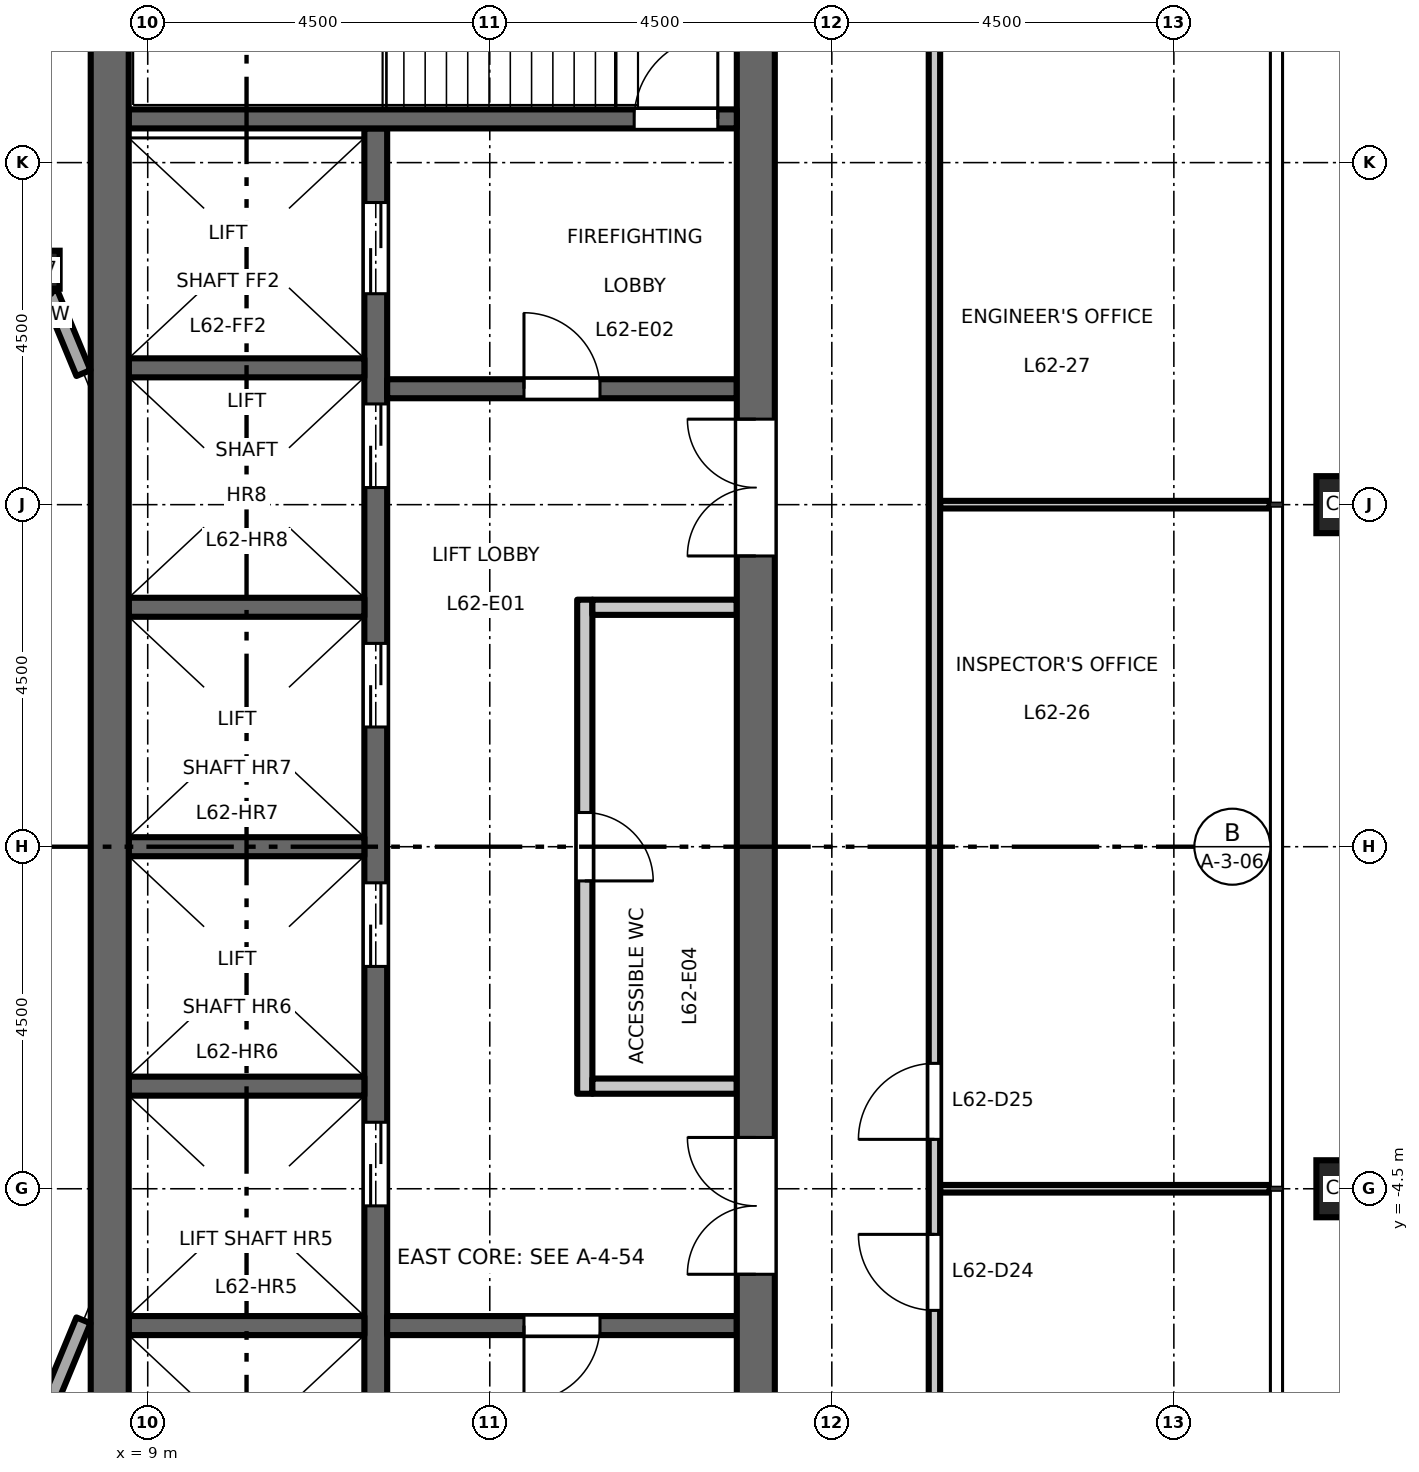
"""IFC4 building model, lengths in metres.
Left out: names, types, materials, properties, quantities, classifications, styles, units other than length and angle.
Written with IfcOpenShell. Run it as: python <this file> out.ifc"""

import sys

from ifc_helpers import new_model, si_unit, direction, frame, frame_2d, origin, origin_2d, place, context, subcontext, project, spatial, rectangle, hollow_rectangle, extrude, element, fill, save


model = new_model("IFC4")
c1 = context("Model", 3, precision=1e-05, world=origin(), true_north=direction((0.0, 1.0)))
c2 = subcontext(c1, "Body", "Model", "MODEL_VIEW")
j1 = project(units=[si_unit("LENGTHUNIT", "METRE"), si_unit("PLANEANGLEUNIT", "RADIAN")], contexts=[c1])
p1 = place(None, origin())
s1 = spatial("IfcSite", under=j1, at=p1, CompositionType="ELEMENT")
p2 = place(p1, origin())
s2 = spatial("IfcBuilding", under=s1, at=p2, CompositionType="ELEMENT")
p3 = place(p2, frame((0.0, 0.0, 289.7)))
s3 = spatial("IfcBuildingStorey", under=s2, at=p3, CompositionType="ELEMENT", Elevation=289.7)
for number, where, z_axis, x_axis in (
    (1, (24.75, -4.5, 0.0), (0.0, 0.0, 1.0), (1.0, 0.0, 0.0)),
    (2, (24.75, 4.5, 0.0), (0.0, 0.0, 1.0), (1.0, 0.0, 0.0)),
):
    element("IfcColumn", number, at=place(p3, frame(where, z_axis=z_axis, x_axis=x_axis)), inside=s3, PredefinedType="COLUMN", context=c2, shape_type="SweptSolid", body=[
        extrude(hollow_rectangle(XDim=0.75, YDim=0.75, WallThickness=0.04, at=origin_2d()), origin(), (0.0, 0.0, 1.0), 4.5),
    ])
p4 = place(p3, frame((7.591, 7.591, 0.0), z_axis=(0.0, 0.0, 1.0), x_axis=(1.0, 0.0, 0.0)))
e3 = element("IfcColumn", 3, at=p4, inside=s3, PredefinedType="COLUMN", context=c2, shape_type="SweptSolid", body=[
    extrude(hollow_rectangle(XDim=0.5, YDim=0.5, WallThickness=0.025, at=origin_2d()), origin(), (0.0, 0.0, 1.0), 4.5),
])
p5 = place(p3, frame((14.75, -3.25, 0.0), z_axis=(0.0, 0.0, 1.0), x_axis=(0.0, 1.0, 0.0)))
e4 = element("IfcWall", 4, at=p5, inside=s3, PredefinedType="PARTITIONING", context=c2, shape_type="SweptSolid", body=[
    extrude(rectangle(XDim=6.5, YDim=0.2, at=frame_2d((3.25, 0.0))), origin(), (0.0, 0.0, 1.0), 4.35),
])
p6 = place(p5, frame((2.8, 0.0, 0.0)))
e5 = element("IfcOpeningElement", 5, at=p6, cuts=e4, PredefinedType="OPENING", context=c2, shape_type="SweptSolid", body=[
    extrude(rectangle(XDim=0.9, YDim=2.1, at=frame_2d((0.45, 1.05))), frame((0.0, 0.11, 0.0), z_axis=(0.0, -1.0, 0.0), x_axis=(1.0, 0.0, 0.0)), (0.0, 0.0, 1.0), 0.22),
])
for number, where, z_axis, x_axis in (
    (6, (14.85, 3.15, 0.0), (0.0, 0.0, 1.0), (1.0, 0.0, 0.0)),
    (7, (14.85, -3.15, 0.0), (0.0, 0.0, 1.0), (1.0, 0.0, 0.0)),
):
    element("IfcWall", number, at=place(p3, frame(where, z_axis=z_axis, x_axis=x_axis)), inside=s3, PredefinedType="PARTITIONING", context=c2, shape_type="SweptSolid", body=[
        extrude(rectangle(XDim=1.9, YDim=0.2, at=frame_2d((0.95, 0.0))), origin(), (0.0, 0.0, 1.0), 4.35),
    ])
p7 = place(p3, frame((12.0, -9.45, 0.0), z_axis=(0.0, 0.0, 1.0), x_axis=(0.0, 1.0, 0.0)))
e8 = element("IfcWall", 8, at=p7, inside=s3, PredefinedType="SHEAR", context=c2, shape_type="SweptSolid", body=[
    extrude(rectangle(XDim=18.9, YDim=0.3, at=frame_2d((9.45, 0.0))), origin(), (0.0, 0.0, 1.0), 4.35),
])
p8 = place(p7, frame((4.725, 0.0, 0.0)))
e9 = element("IfcOpeningElement", 9, at=p8, cuts=e8, PredefinedType="OPENING", context=c2, shape_type="SweptSolid", body=[
    extrude(rectangle(XDim=1.1, YDim=2.1, at=frame_2d((0.55, 1.05))), frame((0.0, 0.16, 0.0), z_axis=(0.0, -1.0, 0.0), x_axis=(1.0, 0.0, 0.0)), (0.0, 0.0, 1.0), 0.32),
])
p9 = place(p7, frame((7.875, 0.0, 0.0)))
e10 = element("IfcOpeningElement", 10, at=p9, cuts=e8, PredefinedType="OPENING", context=c2, shape_type="SweptSolid", body=[
    extrude(rectangle(XDim=1.1, YDim=2.1, at=frame_2d((0.55, 1.05))), frame((0.0, 0.16, 0.0), z_axis=(0.0, -1.0, 0.0), x_axis=(1.0, 0.0, 0.0)), (0.0, 0.0, 1.0), 0.32),
])
p10 = place(p7, frame((11.025, 0.0, 0.0)))
e11 = element("IfcOpeningElement", 11, at=p10, cuts=e8, PredefinedType="OPENING", context=c2, shape_type="SweptSolid", body=[
    extrude(rectangle(XDim=1.1, YDim=2.1, at=frame_2d((0.55, 1.05))), frame((0.0, 0.16, 0.0), z_axis=(0.0, -1.0, 0.0), x_axis=(1.0, 0.0, 0.0)), (0.0, 0.0, 1.0), 0.32),
])
p11 = place(p7, frame((14.175, 0.0, 0.0)))
e12 = element("IfcOpeningElement", 12, at=p11, cuts=e8, PredefinedType="OPENING", context=c2, shape_type="SweptSolid", body=[
    extrude(rectangle(XDim=1.1, YDim=2.1, at=frame_2d((0.55, 1.05))), frame((0.0, 0.16, 0.0), z_axis=(0.0, -1.0, 0.0), x_axis=(1.0, 0.0, 0.0)), (0.0, 0.0, 1.0), 0.32),
])
p12 = place(p7, frame((16.725, 0.0, 0.0)))
e13 = element("IfcOpeningElement", 13, at=p12, cuts=e8, PredefinedType="OPENING", context=c2, shape_type="SweptSolid", body=[
    extrude(rectangle(XDim=1.2, YDim=2.1, at=frame_2d((0.6, 1.05))), frame((0.0, 0.16, 0.0), z_axis=(0.0, -1.0, 0.0), x_axis=(1.0, 0.0, 0.0)), (0.0, 0.0, 1.0), 0.32),
])
p13 = place(p7, frame((0.975, 0.0, 0.0)))
e14 = element("IfcOpeningElement", 14, at=p13, cuts=e8, PredefinedType="OPENING", context=c2, shape_type="SweptSolid", body=[
    extrude(rectangle(XDim=1.2, YDim=2.1, at=frame_2d((0.6, 1.05))), frame((0.0, 0.16, 0.0), z_axis=(0.0, -1.0, 0.0), x_axis=(1.0, 0.0, 0.0)), (0.0, 0.0, 1.0), 0.32),
])
p14 = place(p3, frame((12.15, 6.025, 0.0), z_axis=(0.0, 0.0, 1.0), x_axis=(1.0, 0.0, 0.0)))
e15 = element("IfcWall", 15, at=p14, inside=s3, PredefinedType="SHEAR", context=c2, shape_type="SweptSolid", body=[
    extrude(rectangle(XDim=4.6, YDim=0.25, at=frame_2d((2.3, 0.0))), origin(), (0.0, 0.0, 1.0), 4.35),
])
p15 = place(p14, frame((1.8, 0.0, 0.0)))
e16 = element("IfcOpeningElement", 16, at=p15, cuts=e15, PredefinedType="OPENING", context=c2, shape_type="SweptSolid", body=[
    extrude(rectangle(XDim=1.0, YDim=2.1, at=frame_2d((0.5, 1.05))), frame((0.0, 0.135, 0.0), z_axis=(0.0, -1.0, 0.0), x_axis=(1.0, 0.0, 0.0)), (0.0, 0.0, 1.0), 0.27),
])
p16 = place(p3, frame((12.15, -6.3, 0.0), z_axis=(0.0, 0.0, 1.0), x_axis=(1.0, 0.0, 0.0)))
e17 = element("IfcWall", 17, at=p16, inside=s3, PredefinedType="SHEAR", context=c2, shape_type="SweptSolid", body=[
    extrude(rectangle(XDim=4.6, YDim=0.25, at=frame_2d((2.3, 0.0))), origin(), (0.0, 0.0, 1.0), 4.35),
])
p17 = place(p16, frame((1.8, 0.0, 0.0)))
e18 = element("IfcOpeningElement", 18, at=p17, cuts=e17, PredefinedType="OPENING", context=c2, shape_type="SweptSolid", body=[
    extrude(rectangle(XDim=1.0, YDim=2.1, at=frame_2d((0.5, 1.05))), frame((0.0, 0.135, 0.0), z_axis=(0.0, -1.0, 0.0), x_axis=(1.0, 0.0, 0.0)), (0.0, 0.0, 1.0), 0.27),
])
p18 = place(p3, frame((17.0, -13.0, 0.0), z_axis=(0.0, 0.0, 1.0), x_axis=(0.0, 1.0, 0.0)))
e19 = element("IfcWall", 19, at=p18, inside=s3, PredefinedType="SHEAR", context=c2, shape_type="SweptSolid", body=[
    extrude(rectangle(XDim=26.0, YDim=0.5, at=frame_2d((13.0, 0.0))), origin(), (0.0, 0.0, 1.0), 4.35),
])
p19 = place(p18, frame((16.825, 0.0, 0.0)))
e20 = element("IfcOpeningElement", 20, at=p19, cuts=e19, PredefinedType="OPENING", context=c2, shape_type="SweptSolid", body=[
    extrude(rectangle(XDim=1.8, YDim=2.1, at=frame_2d((0.9, 1.05))), frame((0.0, 0.26, 0.0), z_axis=(0.0, -1.0, 0.0), x_axis=(1.0, 0.0, 0.0)), (0.0, 0.0, 1.0), 0.52),
])
p20 = place(p18, frame((7.375, 0.0, 0.0)))
e21 = element("IfcOpeningElement", 21, at=p20, cuts=e19, PredefinedType="OPENING", context=c2, shape_type="SweptSolid", body=[
    extrude(rectangle(XDim=1.8, YDim=2.1, at=frame_2d((0.9, 1.05))), frame((0.0, 0.26, 0.0), z_axis=(0.0, -1.0, 0.0), x_axis=(1.0, 0.0, 0.0)), (0.0, 0.0, 1.0), 0.52),
])
for number, where, z_axis, x_axis in (
    (22, (8.75, 0.0, 0.0), (0.0, 0.0, 1.0), (1.0, 0.0, 0.0)),
    (23, (8.75, 3.15, 0.0), (0.0, 0.0, 1.0), (1.0, 0.0, 0.0)),
    (24, (8.75, 6.3, 0.0), (0.0, 0.0, 1.0), (1.0, 0.0, 0.0)),
    (25, (8.75, -3.15, 0.0), (0.0, 0.0, 1.0), (1.0, 0.0, 0.0)),
    (26, (8.75, -6.3, 0.0), (0.0, 0.0, 1.0), (1.0, 0.0, 0.0)),
):
    element("IfcWall", number, at=place(p3, frame(where, z_axis=z_axis, x_axis=x_axis)), inside=s3, PredefinedType="SHEAR", context=c2, shape_type="SweptSolid", body=[
        extrude(rectangle(XDim=3.1, YDim=0.25, at=frame_2d((1.55, 0.0))), origin(), (0.0, 0.0, 1.0), 4.35),
    ])
p21 = place(p3, frame((8.75, 9.575, 0.0), z_axis=(0.0, 0.0, 1.0), x_axis=(1.0, 0.0, 0.0)))
e27 = element("IfcWall", 27, at=p21, inside=s3, PredefinedType="SHEAR", context=c2, shape_type="SweptSolid", body=[
    extrude(rectangle(XDim=8.0, YDim=0.25, at=frame_2d((4.0, 0.0))), origin(), (0.0, 0.0, 1.0), 4.35),
])
p22 = place(p21, frame((6.65, 0.0, 0.0)))
e28 = element("IfcOpeningElement", 28, at=p22, cuts=e27, PredefinedType="OPENING", context=c2, shape_type="SweptSolid", body=[
    extrude(rectangle(XDim=1.1, YDim=2.1, at=frame_2d((0.55, 1.05))), frame((0.0, 0.135, 0.0), z_axis=(0.0, -1.0, 0.0), x_axis=(1.0, 0.0, 0.0)), (0.0, 0.0, 1.0), 0.27),
])
p23 = place(p3, frame((8.5, -13.0, 0.0), z_axis=(0.0, 0.0, 1.0), x_axis=(0.0, 1.0, 0.0)))
e29 = element("IfcWall", 29, at=p23, inside=s3, PredefinedType="SHEAR", context=c2, shape_type="SweptSolid", body=[
    extrude(rectangle(XDim=26.0, YDim=0.5, at=frame_2d((13.0, 0.0))), origin(), (0.0, 0.0, 1.0), 4.35),
])
for number, where, z_axis, x_axis in (
    (30, (7.716, -7.289, 0.0), (0.0, 0.0, 1.0), (0.383, 0.924, 0.0)),
    (31, (8.154, 6.231, 0.0), (0.0, 0.0, 1.0), (-0.383, 0.924, 0.0)),
):
    element("IfcWall", number, at=place(p3, frame(where, z_axis=z_axis, x_axis=x_axis)), inside=s3, PredefinedType="STANDARD", context=c2, shape_type="SweptSolid", body=[
        extrude(rectangle(XDim=1.146, YDim=0.2, at=frame_2d((0.573, 0.0))), origin(), (0.0, 0.0, 1.0), 4.01),
    ])
for number, where, z_axis, x_axis in (
    (32, (19.425, -4.5, 0.0), (0.0, 0.0, 1.0), (1.0, 0.0, 0.0)),
    (33, (19.425, 4.5, 0.0), (0.0, 0.0, 1.0), (1.0, 0.0, 0.0)),
):
    element("IfcWall", number, at=place(p3, frame(where, z_axis=z_axis, x_axis=x_axis)), inside=s3, PredefinedType="PARTITIONING", context=c2, shape_type="SweptSolid", body=[
        extrude(rectangle(XDim=4.335, YDim=0.1, at=frame_2d((2.167, 0.0))), origin(), (0.0, 0.0, 1.0), 4.35),
    ])
p24 = place(p3, frame((19.35, -16.425, 0.0), z_axis=(0.0, 0.0, 1.0), x_axis=(0.0, 1.0, 0.0)))
e34 = element("IfcWall", 34, at=p24, inside=s3, PredefinedType="PARTITIONING", context=c2, shape_type="SweptSolid", body=[
    extrude(rectangle(XDim=32.85, YDim=0.15, at=frame_2d((16.425, 0.0))), origin(), (0.0, 0.0, 1.0), 4.35),
])
p25 = place(p24, frame((10.325, 0.0, 0.0)))
e35 = element("IfcOpeningElement", 35, at=p25, cuts=e34, PredefinedType="OPENING", context=c2, shape_type="SweptSolid", body=[
    extrude(rectangle(XDim=1.0, YDim=2.1, at=frame_2d((0.5, 1.05))), frame((0.0, 0.085, 0.0), z_axis=(0.0, -1.0, 0.0), x_axis=(1.0, 0.0, 0.0)), (0.0, 0.0, 1.0), 0.17),
])
p26 = place(p24, frame((12.575, 0.0, 0.0)))
e36 = element("IfcOpeningElement", 36, at=p26, cuts=e34, PredefinedType="OPENING", context=c2, shape_type="SweptSolid", body=[
    extrude(rectangle(XDim=1.0, YDim=2.1, at=frame_2d((0.5, 1.05))), frame((0.0, 0.085, 0.0), z_axis=(0.0, -1.0, 0.0), x_axis=(1.0, 0.0, 0.0)), (0.0, 0.0, 1.0), 0.17),
])
p27 = place(p24, frame((28.325, 0.0, 0.0)))
e37 = element("IfcOpeningElement", 37, at=p27, cuts=e34, PredefinedType="OPENING", context=c2, shape_type="SweptSolid", body=[
    extrude(rectangle(XDim=1.0, YDim=2.1, at=frame_2d((0.5, 1.05))), frame((0.0, 0.085, 0.0), z_axis=(0.0, -1.0, 0.0), x_axis=(1.0, 0.0, 0.0)), (0.0, 0.0, 1.0), 0.17),
])
p28 = place(p15, origin())
e38 = element("IfcDoor", 38, at=p28, inside=s3, OperationType="SINGLE_SWING_RIGHT", PredefinedType="DOOR", context=c2, shape_type="SweptSolid", body=[
    extrude(rectangle(XDim=1.0, YDim=2.1, at=frame_2d((0.5, 1.05))), frame((0.0, 0.025, 0.0), z_axis=(0.0, -1.0, 0.0), x_axis=(1.0, 0.0, 0.0)), (0.0, 0.0, 1.0), 0.05),
])
fill(e16, e38)
p29 = place(p17, origin())
e39 = element("IfcDoor", 39, at=p29, inside=s3, OperationType="SINGLE_SWING_LEFT", PredefinedType="DOOR", context=c2, shape_type="SweptSolid", body=[
    extrude(rectangle(XDim=1.0, YDim=2.1, at=frame_2d((0.5, 1.05))), frame((0.0, 0.025, 0.0), z_axis=(0.0, -1.0, 0.0), x_axis=(1.0, 0.0, 0.0)), (0.0, 0.0, 1.0), 0.05),
])
fill(e18, e39)
p30 = place(p22, origin())
e40 = element("IfcDoor", 40, at=p30, inside=s3, OperationType="SINGLE_SWING_LEFT", PredefinedType="DOOR", context=c2, shape_type="SweptSolid", body=[
    extrude(rectangle(XDim=1.1, YDim=2.1, at=frame_2d((0.55, 1.05))), frame((0.0, 0.025, 0.0), z_axis=(0.0, -1.0, 0.0), x_axis=(1.0, 0.0, 0.0)), (0.0, 0.0, 1.0), 0.05),
])
fill(e28, e40)
p31 = place(p19, origin())
e41 = element("IfcDoor", 41, at=p31, inside=s3, OperationType="DOUBLE_DOOR_DOUBLE_SWING", PredefinedType="DOOR", context=c2, shape_type="SweptSolid", body=[
    extrude(rectangle(XDim=1.8, YDim=2.1, at=frame_2d((0.9, 1.05))), frame((0.0, 0.025, 0.0), z_axis=(0.0, -1.0, 0.0), x_axis=(1.0, 0.0, 0.0)), (0.0, 0.0, 1.0), 0.05),
])
fill(e20, e41)
p32 = place(p20, origin())
e42 = element("IfcDoor", 42, at=p32, inside=s3, OperationType="DOUBLE_DOOR_DOUBLE_SWING", PredefinedType="DOOR", context=c2, shape_type="SweptSolid", body=[
    extrude(rectangle(XDim=1.8, YDim=2.1, at=frame_2d((0.9, 1.05))), frame((0.0, 0.025, 0.0), z_axis=(0.0, -1.0, 0.0), x_axis=(1.0, 0.0, 0.0)), (0.0, 0.0, 1.0), 0.05),
])
fill(e21, e42)
p33 = place(p8, origin())
e43 = element("IfcDoor", 43, at=p33, inside=s3, OperationType="DOUBLE_DOOR_SLIDING", PredefinedType="DOOR", context=c2, shape_type="SweptSolid", body=[
    extrude(rectangle(XDim=1.1, YDim=2.1, at=frame_2d((0.55, 1.05))), frame((0.0, 0.025, 0.0), z_axis=(0.0, -1.0, 0.0), x_axis=(1.0, 0.0, 0.0)), (0.0, 0.0, 1.0), 0.05),
])
fill(e9, e43)
p34 = place(p9, origin())
e44 = element("IfcDoor", 44, at=p34, inside=s3, OperationType="DOUBLE_DOOR_SLIDING", PredefinedType="DOOR", context=c2, shape_type="SweptSolid", body=[
    extrude(rectangle(XDim=1.1, YDim=2.1, at=frame_2d((0.55, 1.05))), frame((0.0, 0.025, 0.0), z_axis=(0.0, -1.0, 0.0), x_axis=(1.0, 0.0, 0.0)), (0.0, 0.0, 1.0), 0.05),
])
fill(e10, e44)
p35 = place(p10, origin())
e45 = element("IfcDoor", 45, at=p35, inside=s3, OperationType="DOUBLE_DOOR_SLIDING", PredefinedType="DOOR", context=c2, shape_type="SweptSolid", body=[
    extrude(rectangle(XDim=1.1, YDim=2.1, at=frame_2d((0.55, 1.05))), frame((0.0, 0.025, 0.0), z_axis=(0.0, -1.0, 0.0), x_axis=(1.0, 0.0, 0.0)), (0.0, 0.0, 1.0), 0.05),
])
fill(e11, e45)
p36 = place(p11, origin())
e46 = element("IfcDoor", 46, at=p36, inside=s3, OperationType="DOUBLE_DOOR_SLIDING", PredefinedType="DOOR", context=c2, shape_type="SweptSolid", body=[
    extrude(rectangle(XDim=1.1, YDim=2.1, at=frame_2d((0.55, 1.05))), frame((0.0, 0.025, 0.0), z_axis=(0.0, -1.0, 0.0), x_axis=(1.0, 0.0, 0.0)), (0.0, 0.0, 1.0), 0.05),
])
fill(e12, e46)
p37 = place(p12, origin())
e47 = element("IfcDoor", 47, at=p37, inside=s3, OperationType="DOUBLE_DOOR_SLIDING", PredefinedType="DOOR", context=c2, shape_type="SweptSolid", body=[
    extrude(rectangle(XDim=1.2, YDim=2.1, at=frame_2d((0.6, 1.05))), frame((0.0, 0.025, 0.0), z_axis=(0.0, -1.0, 0.0), x_axis=(1.0, 0.0, 0.0)), (0.0, 0.0, 1.0), 0.05),
])
fill(e13, e47)
p38 = place(p6, origin())
e48 = element("IfcDoor", 48, at=p38, inside=s3, OperationType="SINGLE_SWING_LEFT", PredefinedType="DOOR", context=c2, shape_type="SweptSolid", body=[
    extrude(rectangle(XDim=0.9, YDim=2.1, at=frame_2d((0.45, 1.05))), frame((0.0, 0.025, 0.0), z_axis=(0.0, -1.0, 0.0), x_axis=(1.0, 0.0, 0.0)), (0.0, 0.0, 1.0), 0.05),
])
fill(e5, e48)
p39 = place(p25, origin())
e49 = element("IfcDoor", 49, at=p39, inside=s3, OperationType="SINGLE_SWING_RIGHT", PredefinedType="DOOR", context=c2, shape_type="SweptSolid", body=[
    extrude(rectangle(XDim=1.0, YDim=2.1, at=frame_2d((0.5, 1.05))), frame((0.0, 0.025, 0.0), z_axis=(0.0, -1.0, 0.0), x_axis=(1.0, 0.0, 0.0)), (0.0, 0.0, 1.0), 0.05),
])
fill(e35, e49)
p40 = place(p26, origin())
e50 = element("IfcDoor", 50, at=p40, inside=s3, OperationType="SINGLE_SWING_LEFT", PredefinedType="DOOR", context=c2, shape_type="SweptSolid", body=[
    extrude(rectangle(XDim=1.0, YDim=2.1, at=frame_2d((0.5, 1.05))), frame((0.0, 0.025, 0.0), z_axis=(0.0, -1.0, 0.0), x_axis=(1.0, 0.0, 0.0)), (0.0, 0.0, 1.0), 0.05),
])
fill(e36, e50)
save(model, sys.argv[1])
